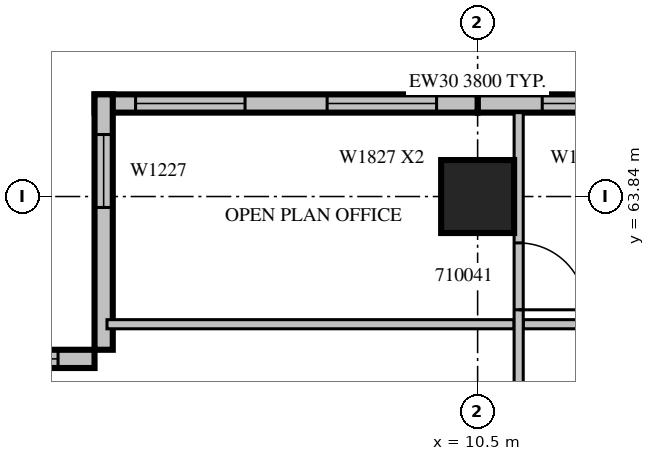
"""IFC4 building model, lengths in metres.
Left out: names, types, materials, properties, quantities, classifications, styles, units other than length and angle.
Written with IfcOpenShell. Run it as: python <this file> out.ifc"""

import sys

from ifc_helpers import new_model, si_unit, direction, frame, frame_2d, origin, origin_2d, place, context, subcontext, project, spatial, rectangle, extrude, source, transform, mapped, element, fill, save


model = new_model("IFC4")
c1 = context("Model", 3, precision=1e-05, world=origin(), true_north=direction((0.0, 1.0)))
c2 = subcontext(c1, "Body", "Model", "MODEL_VIEW")
j1 = project(units=[si_unit("LENGTHUNIT", "METRE"), si_unit("PLANEANGLEUNIT", "RADIAN")], contexts=[c1])
p1 = place(None, origin())
s1 = spatial("IfcSite", under=j1, at=p1, CompositionType="ELEMENT")
p2 = place(p1, origin())
s2 = spatial("IfcBuilding", under=s1, at=p2, CompositionType="ELEMENT")
p3 = place(p2, frame((0.0, 0.0, 53.1)))
s3 = spatial("IfcBuildingStorey", under=s2, at=p3, CompositionType="ELEMENT", Elevation=53.1)
m1 = source(origin(), c2, "Body", "SweptSolid", [
    extrude(rectangle(XDim=1.2, YDim=1.2, at=origin_2d()), origin(), (0.0, 0.0, 1.0), 4.2),
])
p4 = place(p3, frame((10.5, 63.84, 0.0), z_axis=(0.0, 0.0, 1.0), x_axis=(1.0, 0.0, 0.0)))
e1 = element("IfcColumn", 1, at=p4, inside=s3, PredefinedType="COLUMN", context=c2, shape_type="MappedRepresentation", body=[
    mapped(m1, transform((0.0, 0.0, 0.0), scale=1.0)),
])
m2 = source(origin(), c2, "Body", "SweptSolid", [
    extrude(rectangle(XDim=3.15, YDim=0.3, at=frame_2d((1.575, 0.0))), origin(), (0.0, 0.0, 1.0), 3.8),
])
p5 = place(p3, frame((13.65, 65.37, 0.0), z_axis=(0.0, 0.0, 1.0), x_axis=(-1.0, 0.0, 0.0)))
e2 = element("IfcWall", 2, at=p5, inside=s3, PredefinedType="STANDARD", context=c2, shape_type="MappedRepresentation", body=[
    mapped(m2, transform((0.0, 0.0, 0.0), scale=1.0)),
])
m3 = source(origin(), c2, "Body", "SweptSolid", [
    extrude(rectangle(XDim=1.2, YDim=2.7, at=frame_2d((0.6, 1.35))), frame((0.0, 0.16, 0.0), z_axis=(0.0, -1.0, 0.0), x_axis=(1.0, 0.0, 0.0)), (0.0, 0.0, 1.0), 0.32),
])
p6 = place(p5, frame((0.887, 0.0, 0.6)))
e3 = element("IfcOpeningElement", 3, at=p6, cuts=e2, PredefinedType="OPENING", context=c2, shape_type="MappedRepresentation", body=[
    mapped(m3, transform((0.0, 0.0, 0.0), scale=1.0)),
])
m4 = source(origin(), c2, "Body", "SweptSolid", [
    extrude(rectangle(XDim=6.3, YDim=0.3, at=frame_2d((3.15, 0.0))), origin(), (0.0, 0.0, 1.0), 3.8),
])
p7 = place(p3, frame((10.5, 65.37, 0.0), z_axis=(0.0, 0.0, 1.0), x_axis=(-1.0, 0.0, 0.0)))
e4 = element("IfcWall", 4, at=p7, inside=s3, PredefinedType="STANDARD", context=c2, shape_type="MappedRepresentation", body=[
    mapped(m4, transform((0.0, 0.0, 0.0), scale=1.0)),
])
m5 = source(origin(), c2, "Body", "SweptSolid", [
    extrude(rectangle(XDim=1.8, YDim=2.7, at=frame_2d((0.9, 1.35))), frame((0.0, 0.16, 0.0), z_axis=(0.0, -1.0, 0.0), x_axis=(1.0, 0.0, 0.0)), (0.0, 0.0, 1.0), 0.32),
])
p8 = place(p7, frame((0.675, 0.0, 0.6)))
e5 = element("IfcOpeningElement", 5, at=p8, cuts=e4, PredefinedType="OPENING", context=c2, shape_type="MappedRepresentation", body=[
    mapped(m5, transform((0.0, 0.0, 0.0), scale=1.0)),
])
p9 = place(p7, frame((3.825, 0.0, 0.6)))
e6 = element("IfcOpeningElement", 6, at=p9, cuts=e4, PredefinedType="OPENING", context=c2, shape_type="MappedRepresentation", body=[
    mapped(m5, transform((0.0, 0.0, 0.0), scale=1.0)),
])
m6 = source(origin(), c2, "Body", "SweptSolid", [
    extrude(rectangle(XDim=4.2, YDim=0.3, at=frame_2d((2.1, 0.0))), origin(), (0.0, 0.0, 1.0), 3.8),
])
p10 = place(p3, frame((4.35, 65.52, 0.0), z_axis=(0.0, 0.0, 1.0), x_axis=(0.0, -1.0, 0.0)))
e7 = element("IfcWall", 7, at=p10, inside=s3, PredefinedType="STANDARD", context=c2, shape_type="MappedRepresentation", body=[
    mapped(m6, transform((0.0, 0.0, 0.0), scale=1.0)),
])
p11 = place(p10, frame((0.66, 0.0, 0.6)))
e8 = element("IfcOpeningElement", 8, at=p11, cuts=e7, PredefinedType="OPENING", context=c2, shape_type="MappedRepresentation", body=[
    mapped(m3, transform((0.0, 0.0, 0.0), scale=1.0)),
])
p12 = place(p3, frame((4.2, 61.17, 0.0), z_axis=(0.0, 0.0, 1.0), x_axis=(-1.0, 0.0, 0.0)))
e9 = element("IfcWall", 9, at=p12, inside=s3, PredefinedType="STANDARD", context=c2, shape_type="MappedRepresentation", body=[
    mapped(m6, transform((0.0, 0.0, 0.0), scale=1.0)),
])
m7 = source(origin(), c2, "Body", "SweptSolid", [
    extrude(rectangle(XDim=3.0, YDim=2.7, at=frame_2d((1.5, 1.35))), frame((0.0, 0.16, 0.0), z_axis=(0.0, -1.0, 0.0), x_axis=(1.0, 0.0, 0.0)), (0.0, 0.0, 1.0), 0.32),
])
p13 = place(p12, frame((0.6, 0.0, 0.6)))
e10 = element("IfcOpeningElement", 10, at=p13, cuts=e9, PredefinedType="OPENING", context=c2, shape_type="MappedRepresentation", body=[
    mapped(m7, transform((0.0, 0.0, 0.0), scale=1.0)),
])
m8 = source(origin(), c2, "Body", "SweptSolid", [
    extrude(rectangle(XDim=6.695, YDim=0.15, at=frame_2d((3.348, 0.0))), origin(), (0.0, 0.0, 1.0), 3.8),
])
p14 = place(p3, frame((11.1, 61.74, 0.0), z_axis=(0.0, 0.0, 1.0), x_axis=(-1.0, 0.0, 0.0)))
e11 = element("IfcWall", 11, at=p14, inside=s3, PredefinedType="PARTITIONING", context=c2, shape_type="MappedRepresentation", body=[
    mapped(m8, transform((0.0, 0.0, 0.0), scale=1.0)),
])
m9 = source(origin(), c2, "Body", "SweptSolid", [
    extrude(rectangle(XDim=3.75, YDim=0.15, at=frame_2d((1.875, 0.0))), origin(), (0.0, 0.0, 1.0), 3.8),
])
p15 = place(p3, frame((15.0, 61.74, 0.0), z_axis=(0.0, 0.0, 1.0), x_axis=(-1.0, 0.0, 0.0)))
e12 = element("IfcWall", 12, at=p15, inside=s3, PredefinedType="PARTITIONING", context=c2, shape_type="MappedRepresentation", body=[
    mapped(m9, transform((0.0, 0.0, 0.0), scale=1.0)),
])
m10 = source(origin(), c2, "Body", "SweptSolid", [
    extrude(rectangle(XDim=19.02, YDim=0.15, at=frame_2d((9.51, 0.0))), origin(), (0.0, 0.0, 1.0), 3.3),
])
p16 = place(p3, frame((11.175, 46.2, 0.0), z_axis=(0.0, 0.0, 1.0), x_axis=(0.0, 1.0, 0.0)))
e13 = element("IfcWall", 13, at=p16, inside=s3, PredefinedType="PARTITIONING", context=c2, shape_type="MappedRepresentation", body=[
    mapped(m10, transform((0.0, 0.0, 0.0), scale=1.0)),
])
m11 = source(origin(), c2, "Body", "SweptSolid", [
    extrude(rectangle(XDim=1.1, YDim=2.1, at=frame_2d((0.55, 1.05))), frame((0.0, 0.085, 0.0), z_axis=(0.0, -1.0, 0.0), x_axis=(1.0, 0.0, 0.0)), (0.0, 0.0, 1.0), 0.17),
])
p17 = place(p16, frame((13.412, 0.0, 0.0)))
e14 = element("IfcOpeningElement", 14, at=p17, cuts=e13, PredefinedType="OPENING", context=c2, shape_type="MappedRepresentation", body=[
    mapped(m11, transform((0.0, 0.0, 0.0), scale=1.0)),
])
p18 = place(p16, frame((15.777, 0.0, 0.0)))
e15 = element("IfcOpeningElement", 15, at=p18, cuts=e13, PredefinedType="OPENING", context=c2, shape_type="MappedRepresentation", body=[
    mapped(m11, transform((0.0, 0.0, 0.0), scale=1.0)),
])
m12 = source(origin(), c2, "Body", "SweptSolid", [
    extrude(rectangle(XDim=1.2, YDim=2.7, at=frame_2d((0.6, 1.35))), frame((0.0, 0.03, 0.0), z_axis=(0.0, -1.0, 0.0), x_axis=(1.0, 0.0, 0.0)), (0.0, 0.0, 1.0), 0.06),
])
p19 = place(p6, origin())
e16 = element("IfcWindow", 16, at=p19, inside=s3, PartitioningType="SINGLE_PANEL", PredefinedType="WINDOW", context=c2, shape_type="MappedRepresentation", body=[
    mapped(m12, transform((0.0, 0.0, 0.0), scale=1.0)),
])
fill(e3, e16)
m13 = source(origin(), c2, "Body", "SweptSolid", [
    extrude(rectangle(XDim=1.8, YDim=2.7, at=frame_2d((0.9, 1.35))), frame((0.0, 0.03, 0.0), z_axis=(0.0, -1.0, 0.0), x_axis=(1.0, 0.0, 0.0)), (0.0, 0.0, 1.0), 0.06),
])
p20 = place(p8, origin())
e17 = element("IfcWindow", 17, at=p20, inside=s3, PartitioningType="SINGLE_PANEL", PredefinedType="WINDOW", context=c2, shape_type="MappedRepresentation", body=[
    mapped(m13, transform((0.0, 0.0, 0.0), scale=1.0)),
])
fill(e5, e17)
p21 = place(p9, origin())
e18 = element("IfcWindow", 18, at=p21, inside=s3, PartitioningType="SINGLE_PANEL", PredefinedType="WINDOW", context=c2, shape_type="MappedRepresentation", body=[
    mapped(m13, transform((0.0, 0.0, 0.0), scale=1.0)),
])
fill(e6, e18)
p22 = place(p11, origin())
e19 = element("IfcWindow", 19, at=p22, inside=s3, PartitioningType="SINGLE_PANEL", PredefinedType="WINDOW", context=c2, shape_type="MappedRepresentation", body=[
    mapped(m12, transform((0.0, 0.0, 0.0), scale=1.0)),
])
fill(e8, e19)
m14 = source(origin(), c2, "Body", "SweptSolid", [
    extrude(rectangle(XDim=3.0, YDim=2.7, at=frame_2d((1.5, 1.35))), frame((0.0, 0.03, 0.0), z_axis=(0.0, -1.0, 0.0), x_axis=(1.0, 0.0, 0.0)), (0.0, 0.0, 1.0), 0.06),
])
p23 = place(p13, origin())
e20 = element("IfcWindow", 20, at=p23, inside=s3, PartitioningType="SINGLE_PANEL", PredefinedType="WINDOW", context=c2, shape_type="MappedRepresentation", body=[
    mapped(m14, transform((0.0, 0.0, 0.0), scale=1.0)),
])
fill(e10, e20)
m15 = source(origin(), c2, "Body", "SweptSolid", [
    extrude(rectangle(XDim=1.1, YDim=2.1, at=frame_2d((0.55, 1.05))), frame((0.0, 0.025, 0.0), z_axis=(0.0, -1.0, 0.0), x_axis=(1.0, 0.0, 0.0)), (0.0, 0.0, 1.0), 0.05),
])
p24 = place(p18, origin())
e21 = element("IfcDoor", 21, at=p24, inside=s3, OperationType="SINGLE_SWING_RIGHT", PredefinedType="DOOR", context=c2, shape_type="MappedRepresentation", body=[
    mapped(m15, transform((0.0, 0.0, 0.0), scale=1.0)),
])
fill(e15, e21)
save(model, sys.argv[1])
